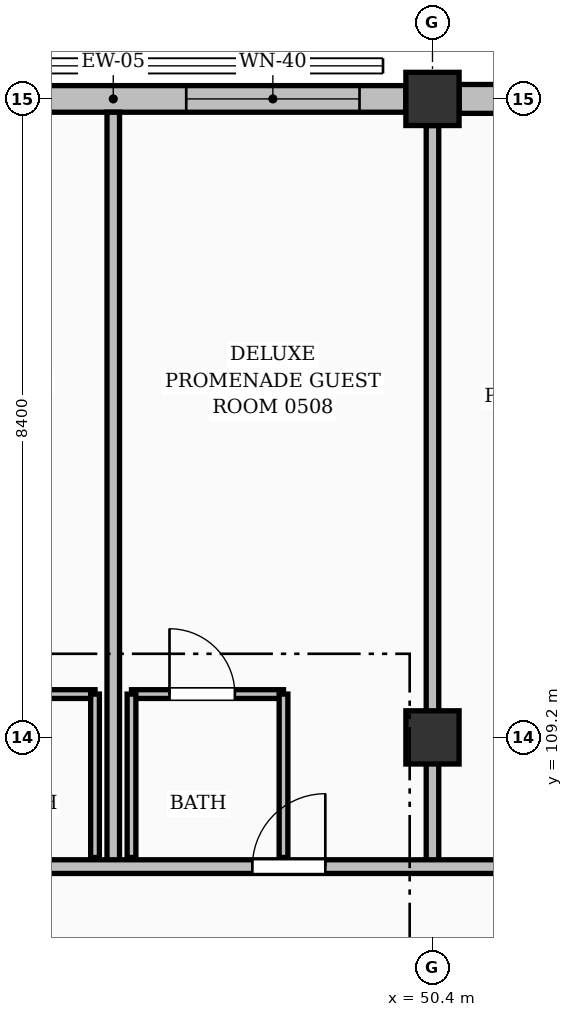
"""IFC4 building model, lengths in metres.
Left out: names, types, materials, properties, quantities, classifications, styles, units other than length and angle.
Written with IfcOpenShell. Run it as: python <this file> out.ifc"""

import sys

from ifc_helpers import new_model, si_unit, direction, frame, frame_2d, origin, origin_2d, place, context, subcontext, project, spatial, rectangle, extrude, element, fill, save


model = new_model("IFC4")
c1 = context("Model", 3, precision=1e-05, world=origin(), true_north=direction((0.0, 1.0)))
c2 = subcontext(c1, "Body", "Model", "MODEL_VIEW")
j1 = project(units=[si_unit("LENGTHUNIT", "METRE"), si_unit("PLANEANGLEUNIT", "RADIAN")], contexts=[c1])
p1 = place(None, origin())
s1 = spatial("IfcSite", under=j1, at=p1, CompositionType="ELEMENT")
p2 = place(p1, origin())
s2 = spatial("IfcBuilding", under=s1, at=p2, CompositionType="ELEMENT")
p3 = place(p2, frame((0.0, 0.0, 18.48)))
s3 = spatial("IfcBuildingStorey", under=s2, at=p3, CompositionType="ELEMENT", Elevation=18.48)
for number, where, z_axis, x_axis in (
    (1, (50.4, 109.2, 0.0), (0.0, 0.0, 1.0), (1.0, 0.0, 0.0)),
    (2, (50.4, 117.6, 0.0), (0.0, 0.0, 1.0), (1.0, 0.0, 0.0)),
):
    element("IfcColumn", number, at=place(p3, frame(where, z_axis=z_axis, x_axis=x_axis)), inside=s3, PredefinedType="COLUMN", context=c2, shape_type="SweptSolid", body=[
        extrude(rectangle(XDim=0.7, YDim=0.7, at=origin_2d()), origin(), (0.0, 0.0, 1.0), 3.36),
    ])
p4 = place(p3, frame((42.351, 117.6, 0.0), z_axis=(0.0, 0.0, 1.0), x_axis=(1.0, 0.0, 0.0)))
e3 = element("IfcWall", 3, at=p4, inside=s3, PredefinedType="SOLIDWALL", context=c2, shape_type="SweptSolid", body=[
    extrude(rectangle(XDim=7.698, YDim=0.35, at=frame_2d((3.849, 0.0))), origin(), (0.0, 0.0, 1.0), 2.494),
])
p5 = place(p4, frame((0.589, 0.0, 0.25)))
e4 = element("IfcOpeningElement", 4, at=p5, cuts=e3, PredefinedType="OPENING", context=c2, shape_type="SweptSolid", body=[
    extrude(rectangle(XDim=2.32, YDim=1.9, at=frame_2d((1.16, 0.95))), frame((0.0, 0.185, 0.0), z_axis=(0.0, -1.0, 0.0), x_axis=(1.0, 0.0, 0.0)), (0.0, 0.0, 1.0), 0.37),
])
p6 = place(p4, frame((4.809, 0.0, 0.25)))
e5 = element("IfcOpeningElement", 5, at=p6, cuts=e3, PredefinedType="OPENING", context=c2, shape_type="SweptSolid", body=[
    extrude(rectangle(XDim=2.28, YDim=2.0, at=frame_2d((1.14, 1.0))), frame((0.0, 0.185, 0.0), z_axis=(0.0, -1.0, 0.0), x_axis=(1.0, 0.0, 0.0)), (0.0, 0.0, 1.0), 0.37),
])
p7 = place(p3, frame((50.751, 117.6, 0.0), z_axis=(0.0, 0.0, 1.0), x_axis=(1.0, 0.0, 0.0)))
e6 = element("IfcWall", 6, at=p7, inside=s3, PredefinedType="SOLIDWALL", context=c2, shape_type="SweptSolid", body=[
    extrude(rectangle(XDim=7.698, YDim=0.38, at=frame_2d((3.849, 0.0))), origin(), (0.0, 0.0, 1.0), 2.494),
])
p8 = place(p7, frame((0.974, 0.0, 0.0)))
e7 = element("IfcOpeningElement", 7, at=p8, cuts=e6, PredefinedType="OPENING", context=c2, shape_type="SweptSolid", body=[
    extrude(rectangle(XDim=1.65, YDim=2.08, at=frame_2d((0.825, 1.04))), frame((0.0, 0.2, 0.0), z_axis=(0.0, -1.0, 0.0), x_axis=(1.0, 0.0, 0.0)), (0.0, 0.0, 1.0), 0.4),
])
p9 = place(p7, frame((4.659, 0.0, 0.25)))
e8 = element("IfcOpeningElement", 8, at=p9, cuts=e6, PredefinedType="OPENING", context=c2, shape_type="SweptSolid", body=[
    extrude(rectangle(XDim=2.28, YDim=2.0, at=frame_2d((1.14, 1.0))), frame((0.0, 0.2, 0.0), z_axis=(0.0, -1.0, 0.0), x_axis=(1.0, 0.0, 0.0)), (0.0, 0.0, 1.0), 0.4),
])
p10 = place(p3, frame((43.96, 109.77, 0.0), z_axis=(0.0, 0.0, 1.0), x_axis=(1.0, 0.0, 0.0)))
e9 = element("IfcWall", 9, at=p10, inside=s3, PredefinedType="PARTITIONING", context=c2, shape_type="SweptSolid", body=[
    extrude(rectangle(XDim=2.0, YDim=0.115, at=frame_2d((1.0, 0.0))), origin(), (0.0, 0.0, 1.0), 3.12),
])
p11 = place(p10, frame((0.5, 0.0, 0.0)))
e10 = element("IfcOpeningElement", 10, at=p11, cuts=e9, PredefinedType="OPENING", context=c2, shape_type="SweptSolid", body=[
    extrude(rectangle(XDim=0.86, YDim=2.05, at=frame_2d((0.43, 1.025))), frame((0.0, 0.067, 0.0), z_axis=(0.0, -1.0, 0.0), x_axis=(1.0, 0.0, 0.0)), (0.0, 0.0, 1.0), 0.135),
])
p12 = place(p3, frame((45.96, 107.62, 0.0), z_axis=(0.0, 0.0, 1.0), x_axis=(0.0, 1.0, 0.0)))
e11 = element("IfcWall", 11, at=p12, inside=s3, PredefinedType="PARTITIONING", context=c2, shape_type="SweptSolid", body=[
    extrude(rectangle(XDim=2.15, YDim=0.115, at=frame_2d((1.075, 0.0))), origin(), (0.0, 0.0, 1.0), 3.12),
])
p13 = place(p3, frame((46.44, 109.77, 0.0), z_axis=(0.0, 0.0, 1.0), x_axis=(1.0, 0.0, 0.0)))
e12 = element("IfcWall", 12, at=p13, inside=s3, PredefinedType="PARTITIONING", context=c2, shape_type="SweptSolid", body=[
    extrude(rectangle(XDim=2.0, YDim=0.115, at=frame_2d((1.0, 0.0))), origin(), (0.0, 0.0, 1.0), 3.12),
])
p14 = place(p13, frame((0.5, 0.0, 0.0)))
e13 = element("IfcOpeningElement", 13, at=p14, cuts=e12, PredefinedType="OPENING", context=c2, shape_type="SweptSolid", body=[
    extrude(rectangle(XDim=0.86, YDim=2.05, at=frame_2d((0.43, 1.025))), frame((0.0, 0.067, 0.0), z_axis=(0.0, -1.0, 0.0), x_axis=(1.0, 0.0, 0.0)), (0.0, 0.0, 1.0), 0.135),
])
p15 = place(p3, frame((46.44, 107.62, 0.0), z_axis=(0.0, 0.0, 1.0), x_axis=(0.0, 1.0, 0.0)))
e14 = element("IfcWall", 14, at=p15, inside=s3, PredefinedType="PARTITIONING", context=c2, shape_type="SweptSolid", body=[
    extrude(rectangle(XDim=2.15, YDim=0.115, at=frame_2d((1.075, 0.0))), origin(), (0.0, 0.0, 1.0), 3.12),
])
p16 = place(p3, frame((48.44, 107.62, 0.0), z_axis=(0.0, 0.0, 1.0), x_axis=(0.0, 1.0, 0.0)))
e15 = element("IfcWall", 15, at=p16, inside=s3, PredefinedType="PARTITIONING", context=c2, shape_type="SweptSolid", body=[
    extrude(rectangle(XDim=2.15, YDim=0.115, at=frame_2d((1.075, 0.0))), origin(), (0.0, 0.0, 1.0), 2.642),
])
p17 = place(p3, frame((46.2, 107.5, 0.0), z_axis=(0.0, 0.0, 1.0), x_axis=(0.0, 1.0, 0.0)))
e16 = element("IfcWall", 16, at=p17, inside=s3, PredefinedType="PARTITIONING", context=c2, shape_type="SweptSolid", body=[
    extrude(rectangle(XDim=9.925, YDim=0.165, at=frame_2d((4.962, 0.0))), origin(), (0.0, 0.0, 1.0), 3.12),
])
p18 = place(p3, frame((50.4, 107.5, 0.0), z_axis=(0.0, 0.0, 1.0), x_axis=(0.0, 1.0, 0.0)))
e17 = element("IfcWall", 17, at=p18, inside=s3, PredefinedType="PARTITIONING", context=c2, shape_type="SweptSolid", body=[
    extrude(rectangle(XDim=9.75, YDim=0.165, at=frame_2d((4.875, 0.0))), origin(), (0.0, 0.0, 1.0), 2.455),
])
p19 = place(p3, frame((40.66, 107.5, 0.0), z_axis=(0.0, 0.0, 1.0), x_axis=(1.0, 0.0, 0.0)))
e18 = element("IfcWall", 18, at=p19, inside=s3, PredefinedType="PARTITIONING", context=c2, shape_type="SweptSolid", body=[
    extrude(rectangle(XDim=43.21, YDim=0.18, at=frame_2d((21.605, 0.0))), origin(), (0.0, 0.0, 1.0), 3.12),
])
p20 = place(p19, frame((0.2, 0.0, 0.0)))
e19 = element("IfcOpeningElement", 19, at=p20, cuts=e18, PredefinedType="OPENING", context=c2, shape_type="SweptSolid", body=[
    extrude(rectangle(XDim=0.94, YDim=2.1, at=frame_2d((0.47, 1.05))), frame((0.0, 0.1, 0.0), z_axis=(0.0, -1.0, 0.0), x_axis=(1.0, 0.0, 0.0)), (0.0, 0.0, 1.0), 0.2),
])
p21 = place(p19, frame((2.71, 0.0, 0.0)))
e20 = element("IfcOpeningElement", 20, at=p21, cuts=e18, PredefinedType="OPENING", context=c2, shape_type="SweptSolid", body=[
    extrude(rectangle(XDim=0.96, YDim=2.15, at=frame_2d((0.48, 1.075))), frame((0.0, 0.1, 0.0), z_axis=(0.0, -1.0, 0.0), x_axis=(1.0, 0.0, 0.0)), (0.0, 0.0, 1.0), 0.2),
])
p22 = place(p19, frame((7.37, 0.0, 0.0)))
e21 = element("IfcOpeningElement", 21, at=p22, cuts=e18, PredefinedType="OPENING", context=c2, shape_type="SweptSolid", body=[
    extrude(rectangle(XDim=0.96, YDim=2.15, at=frame_2d((0.48, 1.075))), frame((0.0, 0.1, 0.0), z_axis=(0.0, -1.0, 0.0), x_axis=(1.0, 0.0, 0.0)), (0.0, 0.0, 1.0), 0.2),
])
p23 = place(p19, frame((11.11, 0.0, 0.0)))
e22 = element("IfcOpeningElement", 22, at=p23, cuts=e18, PredefinedType="OPENING", context=c2, shape_type="SweptSolid", body=[
    extrude(rectangle(XDim=0.96, YDim=2.15, at=frame_2d((0.48, 1.075))), frame((0.0, 0.1, 0.0), z_axis=(0.0, -1.0, 0.0), x_axis=(1.0, 0.0, 0.0)), (0.0, 0.0, 1.0), 0.2),
])
p24 = place(p19, frame((15.77, 0.0, 0.0)))
e23 = element("IfcOpeningElement", 23, at=p24, cuts=e18, PredefinedType="OPENING", context=c2, shape_type="SweptSolid", body=[
    extrude(rectangle(XDim=0.96, YDim=2.15, at=frame_2d((0.48, 1.075))), frame((0.0, 0.1, 0.0), z_axis=(0.0, -1.0, 0.0), x_axis=(1.0, 0.0, 0.0)), (0.0, 0.0, 1.0), 0.2),
])
p25 = place(p19, frame((19.51, 0.0, 0.0)))
e24 = element("IfcOpeningElement", 24, at=p25, cuts=e18, PredefinedType="OPENING", context=c2, shape_type="SweptSolid", body=[
    extrude(rectangle(XDim=0.96, YDim=2.15, at=frame_2d((0.48, 1.075))), frame((0.0, 0.1, 0.0), z_axis=(0.0, -1.0, 0.0), x_axis=(1.0, 0.0, 0.0)), (0.0, 0.0, 1.0), 0.2),
])
p26 = place(p19, frame((24.17, 0.0, 0.0)))
e25 = element("IfcOpeningElement", 25, at=p26, cuts=e18, PredefinedType="OPENING", context=c2, shape_type="SweptSolid", body=[
    extrude(rectangle(XDim=0.96, YDim=2.15, at=frame_2d((0.48, 1.075))), frame((0.0, 0.1, 0.0), z_axis=(0.0, -1.0, 0.0), x_axis=(1.0, 0.0, 0.0)), (0.0, 0.0, 1.0), 0.2),
])
p27 = place(p19, frame((27.91, 0.0, 0.0)))
e26 = element("IfcOpeningElement", 26, at=p27, cuts=e18, PredefinedType="OPENING", context=c2, shape_type="SweptSolid", body=[
    extrude(rectangle(XDim=0.96, YDim=2.15, at=frame_2d((0.48, 1.075))), frame((0.0, 0.1, 0.0), z_axis=(0.0, -1.0, 0.0), x_axis=(1.0, 0.0, 0.0)), (0.0, 0.0, 1.0), 0.2),
])
p28 = place(p19, frame((32.57, 0.0, 0.0)))
e27 = element("IfcOpeningElement", 27, at=p28, cuts=e18, PredefinedType="OPENING", context=c2, shape_type="SweptSolid", body=[
    extrude(rectangle(XDim=0.96, YDim=2.15, at=frame_2d((0.48, 1.075))), frame((0.0, 0.1, 0.0), z_axis=(0.0, -1.0, 0.0), x_axis=(1.0, 0.0, 0.0)), (0.0, 0.0, 1.0), 0.2),
])
p29 = place(p19, frame((36.44, 0.0, 0.0)))
e28 = element("IfcOpeningElement", 28, at=p29, cuts=e18, PredefinedType="OPENING", context=c2, shape_type="SweptSolid", body=[
    extrude(rectangle(XDim=1.02, YDim=2.15, at=frame_2d((0.51, 1.075))), frame((0.0, 0.1, 0.0), z_axis=(0.0, -1.0, 0.0), x_axis=(1.0, 0.0, 0.0)), (0.0, 0.0, 1.0), 0.2),
])
p30 = place(p6, origin())
e29 = element("IfcWindow", 29, at=p30, inside=s3, PartitioningType="DOUBLE_PANEL_VERTICAL", PredefinedType="WINDOW", context=c2, shape_type="SweptSolid", body=[
    extrude(rectangle(XDim=2.28, YDim=2.0, at=frame_2d((1.14, 1.0))), frame((0.0, 0.03, 0.0), z_axis=(0.0, -1.0, 0.0), x_axis=(1.0, 0.0, 0.0)), (0.0, 0.0, 1.0), 0.06),
])
fill(e5, e29)
p31 = place(p14, origin())
e30 = element("IfcDoor", 30, at=p31, inside=s3, OperationType="SINGLE_SWING_LEFT", PredefinedType="DOOR", context=c2, shape_type="SweptSolid", body=[
    extrude(rectangle(XDim=0.86, YDim=2.05, at=frame_2d((0.43, 1.025))), frame((0.0, 0.025, 0.0), z_axis=(0.0, -1.0, 0.0), x_axis=(1.0, 0.0, 0.0)), (0.0, 0.0, 1.0), 0.05),
])
fill(e13, e30)
p32 = place(p22, origin())
e31 = element("IfcDoor", 31, at=p32, inside=s3, OperationType="SINGLE_SWING_RIGHT", PredefinedType="DOOR", context=c2, shape_type="SweptSolid", body=[
    extrude(rectangle(XDim=0.96, YDim=2.15, at=frame_2d((0.48, 1.075))), frame((0.0, 0.025, 0.0), z_axis=(0.0, -1.0, 0.0), x_axis=(1.0, 0.0, 0.0)), (0.0, 0.0, 1.0), 0.05),
])
fill(e21, e31)
save(model, sys.argv[1])
